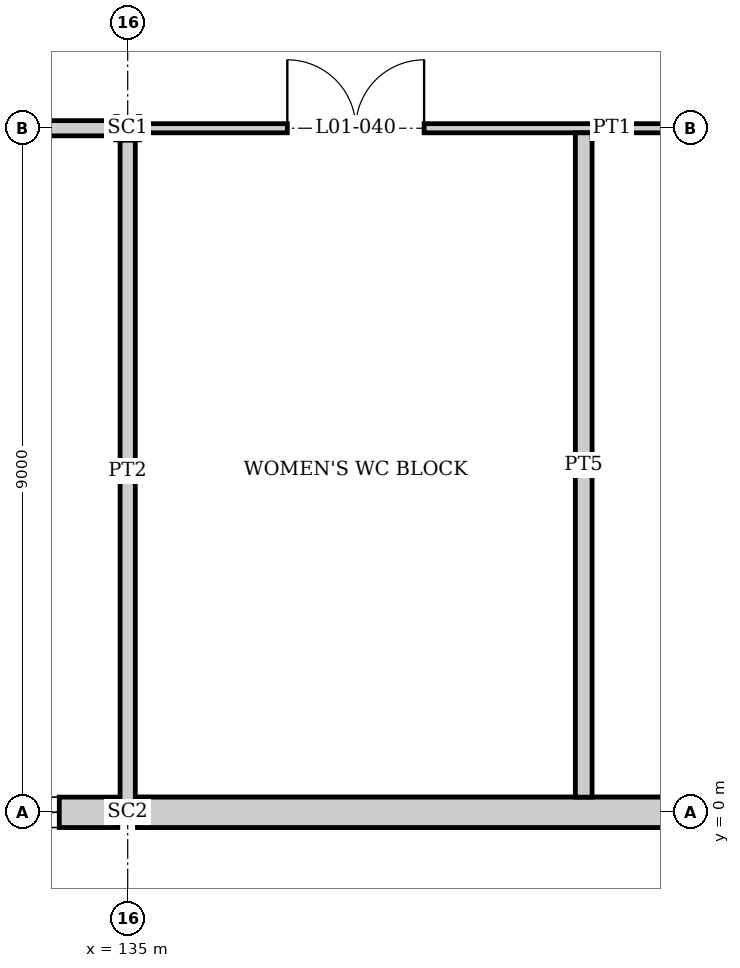
"""IFC4 building model, lengths in metres.
Left out: names, types, materials, properties, quantities, classifications, styles, units other than length and angle.
Written with IfcOpenShell. Run it as: python <this file> out.ifc"""

import sys

from ifc_helpers import new_model, si_unit, direction, frame, frame_2d, origin, origin_2d, place, context, subcontext, project, spatial, polyline, rectangle, i_section, outline, extrude, element, fill, save


model = new_model("IFC4")
c1 = context("Model", 3, precision=1e-05, world=origin(), true_north=direction((0.0, 1.0)))
c2 = subcontext(c1, "Body", "Model", "MODEL_VIEW")
j1 = project(units=[si_unit("LENGTHUNIT", "METRE"), si_unit("PLANEANGLEUNIT", "RADIAN")], contexts=[c1])
p1 = place(None, origin())
s1 = spatial("IfcSite", under=j1, at=p1, CompositionType="ELEMENT")
p2 = place(p1, origin())
s2 = spatial("IfcBuilding", under=s1, at=p2, CompositionType="ELEMENT")
p3 = place(p2, frame((0.0, 0.0, 6.0)))
s3 = spatial("IfcBuildingStorey", under=s2, at=p3, CompositionType="ELEMENT", Elevation=6.0)
p4 = place(p3, frame((135.0, 0.0, 0.0), z_axis=(0.0, 0.0, 1.0), x_axis=(0.0, 1.0, 0.0)))
e1 = element("IfcColumn", 1, at=p4, inside=s3, PredefinedType="COLUMN", context=c2, shape_type="SweptSolid", body=[
    extrude(i_section(OverallWidth=0.256, OverallDepth=0.26, WebThickness=0.01, FlangeThickness=0.017, at=origin_2d()), origin(), (0.0, 0.0, 1.0), 4.5),
])
p5 = place(p3, frame((135.0, 9.0, 0.0), z_axis=(0.0, 0.0, 1.0), x_axis=(0.0, 1.0, 0.0)))
e2 = element("IfcColumn", 2, at=p5, inside=s3, PredefinedType="COLUMN", context=c2, shape_type="SweptSolid", body=[
    extrude(i_section(OverallWidth=0.307, OverallDepth=0.315, WebThickness=0.012, FlangeThickness=0.019, at=origin_2d()), origin(), (0.0, 0.0, 1.0), 4.5),
])
p6 = place(p3, frame((126.0, 0.0, 0.0), z_axis=(0.0, 0.0, 1.0), x_axis=(1.0, 0.0, 0.0)))
e3 = element("IfcWall", 3, at=p6, inside=s3, PredefinedType="SOLIDWALL", context=c2, shape_type="SweptSolid", body=[
    extrude(rectangle(XDim=8.87, YDim=0.4, at=frame_2d((4.435, 0.0))), origin(), (0.0, 0.0, 1.0), 3.991),
])
p7 = place(p6, frame((0.9, 0.0, 1.5)))
e4 = element("IfcOpeningElement", 4, at=p7, cuts=e3, PredefinedType="OPENING", context=c2, shape_type="SweptSolid", body=[
    extrude(rectangle(XDim=2.7, YDim=1.5, at=frame_2d((1.35, 0.75))), frame((0.0, 0.21, 0.0), z_axis=(0.0, -1.0, 0.0), x_axis=(1.0, 0.0, 0.0)), (0.0, 0.0, 1.0), 0.42),
])
p8 = place(p6, frame((5.4, 0.0, 1.5)))
e5 = element("IfcOpeningElement", 5, at=p8, cuts=e3, PredefinedType="OPENING", context=c2, shape_type="SweptSolid", body=[
    extrude(rectangle(XDim=2.7, YDim=1.5, at=frame_2d((1.35, 0.75))), frame((0.0, 0.21, 0.0), z_axis=(0.0, -1.0, 0.0), x_axis=(1.0, 0.0, 0.0)), (0.0, 0.0, 1.0), 0.42),
])
p9 = place(p3, frame((135.13, 0.0, 0.0), z_axis=(0.0, 0.0, 1.0), x_axis=(1.0, 0.0, 0.0)))
e6 = element("IfcWall", 6, at=p9, inside=s3, PredefinedType="SOLIDWALL", context=c2, shape_type="SweptSolid", body=[
    extrude(outline(polyline([(8.74, 0.0), (0.0, 0.0), (0.0, 0.5), (0.048, 0.38), (8.74, 3.86), (8.74, 0.0)])), frame((0.0, 0.2, 0.0), z_axis=(0.0, -1.0, 0.0), x_axis=(1.0, 0.0, 0.0)), (0.0, 0.0, 1.0), 0.4),
])
p10 = place(p3, frame((135.13, 0.0, 0.0), z_axis=(0.0, 0.0, 1.0), x_axis=(1.0, 0.0, 0.0)))
e7 = element("IfcWall", 7, at=p10, inside=s3, PredefinedType="SOLIDWALL", context=c2, shape_type="SweptSolid", body=[
    extrude(outline(polyline([(0.0, 3.991), (8.369, 3.991), (0.0, 0.64), (0.0, 3.991)])), frame((0.0, 0.2, 0.0), z_axis=(0.0, -1.0, 0.0), x_axis=(1.0, 0.0, 0.0)), (0.0, 0.0, 1.0), 0.4),
])
p11 = place(p3, frame((126.0, 9.0, 0.0), z_axis=(0.0, 0.0, 1.0), x_axis=(1.0, 0.0, 0.0)))
e8 = element("IfcWall", 8, at=p11, inside=s3, PredefinedType="PARTITIONING", context=c2, shape_type="SweptSolid", body=[
    extrude(rectangle(XDim=8.843, YDim=0.2, at=frame_2d((4.421, 0.0))), origin(), (0.0, 0.0, 1.0), 3.991),
])
p12 = place(p11, frame((3.75, 0.0, 0.0)))
e9 = element("IfcOpeningElement", 9, at=p12, cuts=e8, PredefinedType="OPENING", context=c2, shape_type="SweptSolid", body=[
    extrude(rectangle(XDim=1.5, YDim=2.1, at=frame_2d((0.75, 1.05))), frame((0.0, 0.11, 0.0), z_axis=(0.0, -1.0, 0.0), x_axis=(1.0, 0.0, 0.0)), (0.0, 0.0, 1.0), 0.22),
])
p13 = place(p3, frame((135.157, 9.0, 0.0), z_axis=(0.0, 0.0, 1.0), x_axis=(1.0, 0.0, 0.0)))
e10 = element("IfcWall", 10, at=p13, inside=s3, PredefinedType="PARTITIONING", context=c2, shape_type="SweptSolid", body=[
    extrude(rectangle(XDim=8.685, YDim=0.12, at=frame_2d((4.343, 0.0))), origin(), (0.0, 0.0, 1.0), 3.991),
])
p14 = place(p13, frame((1.942, 0.0, 0.0)))
e11 = element("IfcOpeningElement", 11, at=p14, cuts=e10, PredefinedType="OPENING", context=c2, shape_type="SweptSolid", body=[
    extrude(rectangle(XDim=1.8, YDim=2.1, at=frame_2d((0.9, 1.05))), frame((0.0, 0.07, 0.0), z_axis=(0.0, -1.0, 0.0), x_axis=(1.0, 0.0, 0.0)), (0.0, 0.0, 1.0), 0.14),
])
p15 = place(p3, frame((135.0, 0.13, 0.0), z_axis=(0.0, 0.0, 1.0), x_axis=(0.0, 1.0, 0.0)))
e12 = element("IfcWall", 12, at=p15, inside=s3, PredefinedType="PARTITIONING", context=c2, shape_type="SweptSolid", body=[
    extrude(rectangle(XDim=8.713, YDim=0.2, at=frame_2d((4.356, 0.0))), origin(), (0.0, 0.0, 1.0), 3.947),
])
p16 = place(p3, frame((141.0, 0.2, 0.0), z_axis=(0.0, 0.0, 1.0), x_axis=(0.0, 1.0, 0.0)))
e13 = element("IfcWall", 13, at=p16, inside=s3, PredefinedType="PLUMBINGWALL", context=c2, shape_type="SweptSolid", body=[
    extrude(rectangle(XDim=8.74, YDim=0.22, at=frame_2d((4.37, 0.0))), origin(), (0.0, 0.0, 1.0), 3.991),
])
p17 = place(p8, origin())
e14 = element("IfcWindow", 14, at=p17, inside=s3, PartitioningType="SINGLE_PANEL", PredefinedType="WINDOW", context=c2, shape_type="SweptSolid", body=[
    extrude(rectangle(XDim=2.7, YDim=1.5, at=frame_2d((1.35, 0.75))), frame((0.0, 0.03, 0.0), z_axis=(0.0, -1.0, 0.0), x_axis=(1.0, 0.0, 0.0)), (0.0, 0.0, 1.0), 0.06),
])
fill(e5, e14)
p18 = place(p14, origin())
e15 = element("IfcDoor", 15, at=p18, inside=s3, OperationType="DOUBLE_DOOR_SINGLE_SWING", PredefinedType="DOOR", context=c2, shape_type="SweptSolid", body=[
    extrude(rectangle(XDim=1.8, YDim=2.1, at=frame_2d((0.9, 1.05))), frame((0.0, 0.025, 0.0), z_axis=(0.0, -1.0, 0.0), x_axis=(1.0, 0.0, 0.0)), (0.0, 0.0, 1.0), 0.05),
])
fill(e11, e15)
save(model, sys.argv[1])
